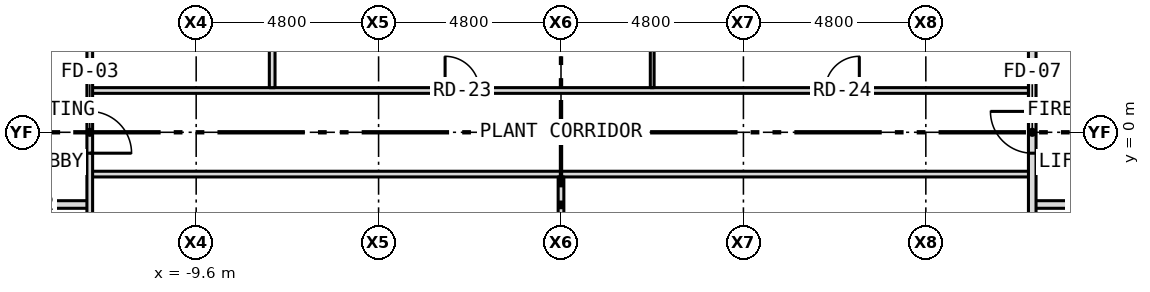
"""IFC4 building model, lengths in metres.
Left out: names, types, materials, properties, quantities, classifications, styles, units other than length and angle.
Written with IfcOpenShell. Run it as: python <this file> out.ifc"""

import sys

from ifc_helpers import new_model, si_unit, direction, frame, frame_2d, origin, place, context, subcontext, project, spatial, rectangle, extrude, element, fill, save


model = new_model("IFC4")
c1 = context("Model", 3, precision=1e-05, world=origin(), true_north=direction((0.0, 1.0)))
c2 = subcontext(c1, "Body", "Model", "MODEL_VIEW")
j1 = project(units=[si_unit("LENGTHUNIT", "METRE"), si_unit("PLANEANGLEUNIT", "RADIAN")], contexts=[c1])
p1 = place(None, origin())
s1 = spatial("IfcSite", under=j1, at=p1, CompositionType="ELEMENT")
p2 = place(p1, origin())
s2 = spatial("IfcBuilding", under=s1, at=p2, CompositionType="ELEMENT")
p3 = place(p2, frame((0.0, 0.0, -5.0)))
s3 = spatial("IfcBuildingStorey", under=s2, at=p3, CompositionType="ELEMENT", Elevation=-5.0)
p4 = place(p3, frame((-15.68, -1.9, 0.0), z_axis=(0.0, 0.0, 1.0), x_axis=(1.0, 0.0, 0.0)))
e1 = element("IfcWall", 1, at=p4, inside=s3, PredefinedType="PARTITIONING", context=c2, shape_type="SweptSolid", body=[
    extrude(rectangle(XDim=3.28, YDim=0.2, at=frame_2d((1.64, 0.0))), origin(), (0.0, 0.0, 1.0), 4.7),
])
p5 = place(p4, frame((1.03, 0.0, 0.0)))
e2 = element("IfcOpeningElement", 2, at=p5, cuts=e1, PredefinedType="OPENING", context=c2, shape_type="SweptSolid", body=[
    extrude(rectangle(XDim=1.1, YDim=2.1, at=frame_2d((0.55, 1.05))), frame((0.0, 0.112, 0.0), z_axis=(0.0, -1.0, 0.0), x_axis=(1.0, 0.0, 0.0)), (0.0, 0.0, 1.0), 0.224),
])
p6 = place(p3, frame((12.4, -1.9, 0.0), z_axis=(0.0, 0.0, 1.0), x_axis=(1.0, 0.0, 0.0)))
e3 = element("IfcWall", 3, at=p6, inside=s3, PredefinedType="PARTITIONING", context=c2, shape_type="SweptSolid", body=[
    extrude(rectangle(XDim=3.28, YDim=0.2, at=frame_2d((1.64, 0.0))), origin(), (0.0, 0.0, 1.0), 4.7),
])
p7 = place(p6, frame((1.15, 0.0, 0.0)))
e4 = element("IfcOpeningElement", 4, at=p7, cuts=e3, PredefinedType="OPENING", context=c2, shape_type="SweptSolid", body=[
    extrude(rectangle(XDim=1.1, YDim=2.1, at=frame_2d((0.55, 1.05))), frame((0.0, 0.112, 0.0), z_axis=(0.0, -1.0, 0.0), x_axis=(1.0, 0.0, 0.0)), (0.0, 0.0, 1.0), 0.224),
])
p8 = place(p3, frame((-12.4, -1.1, 0.0), z_axis=(0.0, 0.0, 1.0), x_axis=(1.0, 0.0, 0.0)))
e5 = element("IfcWall", 5, at=p8, inside=s3, PredefinedType="PARTITIONING", context=c2, shape_type="SweptSolid", body=[
    extrude(rectangle(XDim=24.8, YDim=0.15, at=frame_2d((12.4, 0.0))), origin(), (0.0, 0.0, 1.0), 4.7),
])
p9 = place(p3, frame((-12.4, 1.1, 0.0), z_axis=(0.0, 0.0, 1.0), x_axis=(1.0, 0.0, 0.0)))
e6 = element("IfcWall", 6, at=p9, inside=s3, PredefinedType="PARTITIONING", context=c2, shape_type="SweptSolid", body=[
    extrude(rectangle(XDim=24.8, YDim=0.15, at=frame_2d((12.4, 0.0))), origin(), (0.0, 0.0, 1.0), 4.7),
])
p10 = place(p9, frame((9.35, 0.0, 0.0)))
e7 = element("IfcOpeningElement", 7, at=p10, cuts=e6, PredefinedType="OPENING", context=c2, shape_type="SweptSolid", body=[
    extrude(rectangle(XDim=0.9, YDim=2.1, at=frame_2d((0.45, 1.05))), frame((0.0, 0.087, 0.0), z_axis=(0.0, -1.0, 0.0), x_axis=(1.0, 0.0, 0.0)), (0.0, 0.0, 1.0), 0.174),
])
p11 = place(p9, frame((19.35, 0.0, 0.0)))
e8 = element("IfcOpeningElement", 8, at=p11, cuts=e6, PredefinedType="OPENING", context=c2, shape_type="SweptSolid", body=[
    extrude(rectangle(XDim=0.9, YDim=2.1, at=frame_2d((0.45, 1.05))), frame((0.0, 0.087, 0.0), z_axis=(0.0, -1.0, 0.0), x_axis=(1.0, 0.0, 0.0)), (0.0, 0.0, 1.0), 0.174),
])
p12 = place(p3, frame((-12.4, -10.725, 0.0), z_axis=(0.0, 0.0, 1.0), x_axis=(0.0, 1.0, 0.0)))
e9 = element("IfcWall", 9, at=p12, inside=s3, PredefinedType="PARTITIONING", context=c2, shape_type="SweptSolid", body=[
    extrude(rectangle(XDim=12.925, YDim=0.15, at=frame_2d((6.462, 0.0))), origin(), (0.0, 0.0, 1.0), 4.7),
])
p13 = place(p12, frame((10.175, 0.0, 0.0)))
e10 = element("IfcOpeningElement", 10, at=p13, cuts=e9, PredefinedType="OPENING", context=c2, shape_type="SweptSolid", body=[
    extrude(rectangle(XDim=1.1, YDim=2.1, at=frame_2d((0.55, 1.05))), frame((0.0, 0.087, 0.0), z_axis=(0.0, -1.0, 0.0), x_axis=(1.0, 0.0, 0.0)), (0.0, 0.0, 1.0), 0.174),
])
p14 = place(p3, frame((-7.6, 1.175, 0.0), z_axis=(0.0, 0.0, 1.0), x_axis=(0.0, 1.0, 0.0)))
e11 = element("IfcWall", 11, at=p14, inside=s3, PredefinedType="PARTITIONING", context=c2, shape_type="SweptSolid", body=[
    extrude(rectangle(XDim=11.075, YDim=0.15, at=frame_2d((5.538, 0.0))), origin(), (0.0, 0.0, 1.0), 4.7),
])
p15 = place(p3, frame((0.0, -4.646, 0.0), z_axis=(0.0, 0.0, 1.0), x_axis=(0.0, 1.0, 0.0)))
e12 = element("IfcWall", 12, at=p15, inside=s3, PredefinedType="PARTITIONING", context=c2, shape_type="SweptSolid", body=[
    extrude(rectangle(XDim=3.471, YDim=0.15, at=frame_2d((1.735, 0.0))), origin(), (0.0, 0.0, 1.0), 4.083),
])
p16 = place(p3, frame((2.4, 1.175, 0.0), z_axis=(0.0, 0.0, 1.0), x_axis=(0.0, 1.0, 0.0)))
e13 = element("IfcWall", 13, at=p16, inside=s3, PredefinedType="PARTITIONING", context=c2, shape_type="SweptSolid", body=[
    extrude(rectangle(XDim=11.075, YDim=0.1, at=frame_2d((5.538, 0.0))), origin(), (0.0, 0.0, 1.0), 4.7),
])
p17 = place(p3, frame((12.4, -10.725, 0.0), z_axis=(0.0, 0.0, 1.0), x_axis=(0.0, 1.0, 0.0)))
e14 = element("IfcWall", 14, at=p17, inside=s3, PredefinedType="PARTITIONING", context=c2, shape_type="SweptSolid", body=[
    extrude(rectangle(XDim=22.975, YDim=0.2, at=frame_2d((11.488, 0.0))), origin(), (0.0, 0.0, 1.0), 4.7),
])
p18 = place(p17, frame((10.175, 0.0, 0.0)))
e15 = element("IfcOpeningElement", 15, at=p18, cuts=e14, PredefinedType="OPENING", context=c2, shape_type="SweptSolid", body=[
    extrude(rectangle(XDim=1.1, YDim=2.1, at=frame_2d((0.55, 1.05))), frame((0.0, 0.112, 0.0), z_axis=(0.0, -1.0, 0.0), x_axis=(1.0, 0.0, 0.0)), (0.0, 0.0, 1.0), 0.224),
])
p19 = place(p13, origin())
e16 = element("IfcDoor", 16, at=p19, inside=s3, OperationType="SINGLE_SWING_LEFT", PredefinedType="DOOR", context=c2, shape_type="SweptSolid", body=[
    extrude(rectangle(XDim=1.1, YDim=2.1, at=frame_2d((0.55, 1.05))), frame((0.0, 0.025, 0.0), z_axis=(0.0, -1.0, 0.0), x_axis=(1.0, 0.0, 0.0)), (0.0, 0.0, 1.0), 0.05),
])
fill(e10, e16)
p20 = place(p18, origin())
e17 = element("IfcDoor", 17, at=p20, inside=s3, OperationType="SINGLE_SWING_RIGHT", PredefinedType="DOOR", context=c2, shape_type="SweptSolid", body=[
    extrude(rectangle(XDim=1.1, YDim=2.1, at=frame_2d((0.55, 1.05))), frame((0.0, 0.025, 0.0), z_axis=(0.0, -1.0, 0.0), x_axis=(1.0, 0.0, 0.0)), (0.0, 0.0, 1.0), 0.05),
])
fill(e15, e17)
p21 = place(p10, origin())
e18 = element("IfcDoor", 18, at=p21, inside=s3, OperationType="SINGLE_SWING_LEFT", PredefinedType="DOOR", context=c2, shape_type="SweptSolid", body=[
    extrude(rectangle(XDim=0.9, YDim=2.1, at=frame_2d((0.45, 1.05))), frame((0.0, 0.025, 0.0), z_axis=(0.0, -1.0, 0.0), x_axis=(1.0, 0.0, 0.0)), (0.0, 0.0, 1.0), 0.05),
])
fill(e7, e18)
p22 = place(p11, origin())
e19 = element("IfcDoor", 19, at=p22, inside=s3, OperationType="SINGLE_SWING_RIGHT", PredefinedType="DOOR", context=c2, shape_type="SweptSolid", body=[
    extrude(rectangle(XDim=0.9, YDim=2.1, at=frame_2d((0.45, 1.05))), frame((0.0, 0.025, 0.0), z_axis=(0.0, -1.0, 0.0), x_axis=(1.0, 0.0, 0.0)), (0.0, 0.0, 1.0), 0.05),
])
fill(e8, e19)
save(model, sys.argv[1])
